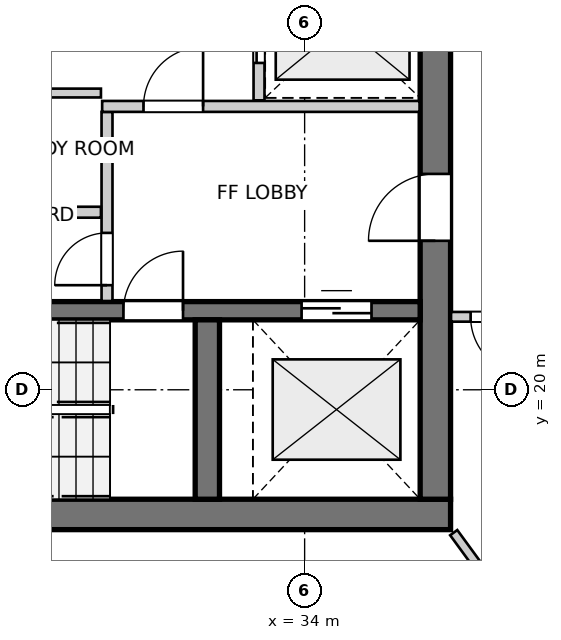
"""IFC4 building model, lengths in metres.
Left out: names, types, materials, properties, quantities, classifications, styles, units other than length and angle.
Written with IfcOpenShell. Run it as: python <this file> out.ifc"""

import sys

from ifc_helpers import new_model, si_unit, direction, frame, frame_2d, origin, place, context, subcontext, project, spatial, rectangle, extrude, source, transform, mapped, element, fill, save


model = new_model("IFC4")
c1 = context("Model", 3, precision=1e-05, world=origin(), true_north=direction((0.0, 1.0)))
c2 = subcontext(c1, "Body", "Model", "MODEL_VIEW")
j1 = project(units=[si_unit("LENGTHUNIT", "METRE"), si_unit("PLANEANGLEUNIT", "RADIAN")], contexts=[c1])
p1 = place(None, origin())
s1 = spatial("IfcSite", under=j1, at=p1, CompositionType="ELEMENT")
p2 = place(p1, origin())
s2 = spatial("IfcBuilding", under=s1, at=p2, CompositionType="ELEMENT")
p3 = place(p2, frame((0.0, 0.0, 214.8)))
s3 = spatial("IfcBuildingStorey", under=s2, at=p3, CompositionType="ELEMENT", Elevation=214.8)
p4 = place(p3, frame((24.3, 17.95, 0.0), z_axis=(0.0, 0.0, 1.0), x_axis=(1.0, 0.0, 0.0)))
e1 = element("IfcWall", 1, at=p4, inside=s3, PredefinedType="SHEAR", context=c2, shape_type="SweptSolid", body=[
    extrude(rectangle(XDim=12.1, YDim=0.5, at=frame_2d((6.05, 0.0))), origin(), (0.0, 0.0, 1.0), 2.96),
])
p5 = place(p3, frame((36.15, 18.2, 0.0), z_axis=(0.0, 0.0, 1.0), x_axis=(0.0, 1.0, 0.0)))
e2 = element("IfcWall", 2, at=p5, inside=s3, PredefinedType="SHEAR", context=c2, shape_type="SweptSolid", body=[
    extrude(rectangle(XDim=15.6, YDim=0.5, at=frame_2d((7.8, 0.0))), origin(), (0.0, 0.0, 1.0), 2.96),
])
p6 = place(p5, frame((4.25, 0.0, 0.0)))
e3 = element("IfcOpeningElement", 3, at=p6, cuts=e2, PredefinedType="OPENING", context=c2, shape_type="SweptSolid", body=[
    extrude(rectangle(XDim=1.1, YDim=2.15, at=frame_2d((0.55, 1.075))), frame((0.0, 0.26, 0.0), z_axis=(0.0, -1.0, 0.0), x_axis=(1.0, 0.0, 0.0)), (0.0, 0.0, 1.0), 0.52),
])
p7 = place(p5, frame((10.25, 0.0, 0.0)))
e4 = element("IfcOpeningElement", 4, at=p7, cuts=e2, PredefinedType="OPENING", context=c2, shape_type="SweptSolid", body=[
    extrude(rectangle(XDim=1.1, YDim=2.15, at=frame_2d((0.55, 1.075))), frame((0.0, 0.26, 0.0), z_axis=(0.0, -1.0, 0.0), x_axis=(1.0, 0.0, 0.0)), (0.0, 0.0, 1.0), 0.52),
])
p8 = place(p3, frame((24.8, 21.3, 0.0), z_axis=(0.0, 0.0, 1.0), x_axis=(1.0, 0.0, 0.0)))
e5 = element("IfcWall", 5, at=p8, inside=s3, PredefinedType="SHEAR", context=c2, shape_type="SweptSolid", body=[
    extrude(rectangle(XDim=11.1, YDim=0.3, at=frame_2d((5.55, 0.0))), origin(), (0.0, 0.0, 1.0), 2.96),
])
p9 = place(p8, frame((6.22, 0.0, 0.0)))
e6 = element("IfcOpeningElement", 6, at=p9, cuts=e5, PredefinedType="OPENING", context=c2, shape_type="SweptSolid", body=[
    extrude(rectangle(XDim=0.98, YDim=2.15, at=frame_2d((0.49, 1.075))), frame((0.0, 0.16, 0.0), z_axis=(0.0, -1.0, 0.0), x_axis=(1.0, 0.0, 0.0)), (0.0, 0.0, 1.0), 0.32),
])
p10 = place(p8, frame((9.15, 0.0, 0.0)))
e7 = element("IfcOpeningElement", 7, at=p10, cuts=e5, PredefinedType="OPENING", context=c2, shape_type="SweptSolid", body=[
    extrude(rectangle(XDim=1.15, YDim=2.15, at=frame_2d((0.575, 1.075))), frame((0.0, 0.16, 0.0), z_axis=(0.0, -1.0, 0.0), x_axis=(1.0, 0.0, 0.0)), (0.0, 0.0, 1.0), 0.32),
])
p11 = place(p3, frame((32.4, 18.2, 0.0), z_axis=(0.0, 0.0, 1.0), x_axis=(0.0, 1.0, 0.0)))
e8 = element("IfcWall", 8, at=p11, inside=s3, PredefinedType="SHEAR", context=c2, shape_type="SweptSolid", body=[
    extrude(rectangle(XDim=2.95, YDim=0.4, at=frame_2d((1.475, 0.0))), origin(), (0.0, 0.0, 1.0), 2.96),
])
p12 = place(p3, frame((30.75, 21.46, 0.0), z_axis=(0.0, 0.0, 1.0), x_axis=(0.0, 1.0, 0.0)))
e9 = element("IfcWall", 9, at=p12, inside=s3, PredefinedType="PARTITIONING", context=c2, shape_type="SweptSolid", body=[
    extrude(rectangle(XDim=3.11, YDim=0.18, at=frame_2d((1.555, 0.0))), origin(), (0.0, 0.0, 1.0), 2.96),
])
p13 = place(p12, frame((0.26, 0.0, 0.0)))
e10 = element("IfcOpeningElement", 10, at=p13, cuts=e9, PredefinedType="OPENING", context=c2, shape_type="SweptSolid", body=[
    extrude(rectangle(XDim=0.86, YDim=2.05, at=frame_2d((0.43, 1.025))), frame((0.0, 0.1, 0.0), z_axis=(0.0, -1.0, 0.0), x_axis=(1.0, 0.0, 0.0)), (0.0, 0.0, 1.0), 0.2),
])
p14 = place(p3, frame((30.67, 24.66, 0.0), z_axis=(0.0, 0.0, 1.0), x_axis=(1.0, 0.0, 0.0)))
e11 = element("IfcWall", 11, at=p14, inside=s3, PredefinedType="PARTITIONING", context=c2, shape_type="SweptSolid", body=[
    extrude(rectangle(XDim=5.22, YDim=0.18, at=frame_2d((2.61, 0.0))), origin(), (0.0, 0.0, 1.0), 2.96),
])
p15 = place(p14, frame((0.68, 0.0, 0.0)))
e12 = element("IfcOpeningElement", 12, at=p15, cuts=e11, PredefinedType="OPENING", context=c2, shape_type="SweptSolid", body=[
    extrude(rectangle(XDim=0.98, YDim=2.15, at=frame_2d((0.49, 1.075))), frame((0.0, 0.1, 0.0), z_axis=(0.0, -1.0, 0.0), x_axis=(1.0, 0.0, 0.0)), (0.0, 0.0, 1.0), 0.2),
])
p16 = place(p3, frame((33.25, 24.76, 0.0), z_axis=(0.0, 0.0, 1.0), x_axis=(0.0, 1.0, 0.0)))
e13 = element("IfcWall", 13, at=p16, inside=s3, PredefinedType="PARTITIONING", context=c2, shape_type="SweptSolid", body=[
    extrude(rectangle(XDim=2.48, YDim=0.18, at=frame_2d((1.24, 0.0))), origin(), (0.0, 0.0, 1.0), 2.96),
])
p17 = place(p16, frame((0.615, 0.0, 0.0)))
e14 = element("IfcOpeningElement", 14, at=p17, cuts=e13, PredefinedType="OPENING", context=c2, shape_type="SweptSolid", body=[
    extrude(rectangle(XDim=1.25, YDim=2.15, at=frame_2d((0.625, 1.075))), frame((0.0, 0.1, 0.0), z_axis=(0.0, -1.0, 0.0), x_axis=(1.0, 0.0, 0.0)), (0.0, 0.0, 1.0), 0.2),
])
p18 = place(p3, frame((24.81, 22.92, 0.0), z_axis=(0.0, 0.0, 1.0), x_axis=(1.0, 0.0, 0.0)))
e15 = element("IfcWall", 15, at=p18, inside=s3, PredefinedType="PARTITIONING", context=c2, shape_type="SweptSolid", body=[
    extrude(rectangle(XDim=5.84, YDim=0.18, at=frame_2d((2.92, 0.0))), origin(), (0.0, 0.0, 1.0), 2.96),
])
p19 = place(p3, frame((24.81, 24.88, 0.0), z_axis=(0.0, 0.0, 1.0), x_axis=(1.0, 0.0, 0.0)))
e16 = element("IfcWall", 16, at=p19, inside=s3, PredefinedType="PARTITIONING", context=c2, shape_type="SweptSolid", body=[
    extrude(rectangle(XDim=5.84, YDim=0.145, at=frame_2d((2.92, 0.0))), origin(), (0.0, 0.0, 1.0), 2.96),
])
p20 = place(p19, frame((2.4, 0.0, 0.0)))
e17 = element("IfcOpeningElement", 17, at=p20, cuts=e16, PredefinedType="OPENING", context=c2, shape_type="SweptSolid", body=[
    extrude(rectangle(XDim=0.96, YDim=2.1, at=frame_2d((0.48, 1.05))), frame((0.0, 0.083, 0.0), z_axis=(0.0, -1.0, 0.0), x_axis=(1.0, 0.0, 0.0)), (0.0, 0.0, 1.0), 0.165),
])
p21 = place(p3, frame((38.02, 21.2, 0.0), z_axis=(0.0, 0.0, 1.0), x_axis=(-1.0, 0.0, 0.0)))
e18 = element("IfcWall", 18, at=p21, inside=s3, PredefinedType="PARTITIONING", context=c2, shape_type="SweptSolid", body=[
    extrude(rectangle(XDim=1.612, YDim=0.16, at=frame_2d((0.806, 0.0))), origin(), (0.0, 0.0, 1.0), 2.96),
])
p22 = place(p21, frame((0.33, 0.0, 0.0)))
e19 = element("IfcOpeningElement", 19, at=p22, cuts=e18, PredefinedType="OPENING", context=c2, shape_type="SweptSolid", body=[
    extrude(rectangle(XDim=0.96, YDim=2.1, at=frame_2d((0.48, 1.05))), frame((0.0, 0.09, 0.0), z_axis=(0.0, -1.0, 0.0), x_axis=(1.0, 0.0, 0.0)), (0.0, 0.0, 1.0), 0.18),
])
p23 = place(p3, frame((36.452, 17.651, 0.0), z_axis=(0.0, 0.0, 1.0), x_axis=(0.58995882053, -0.807433334758, 0.0)))
e20 = element("IfcWall", 20, at=p23, inside=s3, PredefinedType="PARTITIONING", context=c2, shape_type="SweptSolid", body=[
    extrude(rectangle(XDim=5.722, YDim=0.145, at=frame_2d((2.861, 0.0))), origin(), (0.0, 0.0, 1.0), 2.96),
])
m1 = source(origin(), c2, "Body", "SweptSolid", [
    extrude(rectangle(XDim=0.98, YDim=2.15, at=frame_2d((0.49, 1.075))), frame((0.0, 0.025, 0.0), z_axis=(0.0, -1.0, 0.0), x_axis=(1.0, 0.0, 0.0)), (0.0, 0.0, 1.0), 0.05),
])
p24 = place(p9, origin())
e21 = element("IfcDoor", 21, at=p24, inside=s3, OperationType="SINGLE_SWING_RIGHT", PredefinedType="DOOR", context=c2, shape_type="MappedRepresentation", body=[
    mapped(m1, transform((0.0, 0.0, 0.0), x_axis=(1.0, 0.0, 0.0), y_axis=(0.0, 1.0, 0.0), z_axis=(0.0, 0.0, 1.0), scale=1.0)),
])
fill(e6, e21)
m2 = source(origin(), c2, "Body", "SweptSolid", [
    extrude(rectangle(XDim=1.15, YDim=2.15, at=frame_2d((0.575, 1.075))), frame((0.0, 0.025, 0.0), z_axis=(0.0, -1.0, 0.0), x_axis=(1.0, 0.0, 0.0)), (0.0, 0.0, 1.0), 0.05),
])
p25 = place(p10, origin())
e22 = element("IfcDoor", 22, at=p25, inside=s3, OperationType="DOUBLE_DOOR_SLIDING", PredefinedType="DOOR", context=c2, shape_type="MappedRepresentation", body=[
    mapped(m2, transform((0.0, 0.0, 0.0), x_axis=(1.0, 0.0, 0.0), y_axis=(0.0, 1.0, 0.0), z_axis=(0.0, 0.0, 1.0), scale=1.0)),
])
fill(e7, e22)
m3 = source(origin(), c2, "Body", "SweptSolid", [
    extrude(rectangle(XDim=1.1, YDim=2.15, at=frame_2d((0.55, 1.075))), frame((0.0, 0.025, 0.0), z_axis=(0.0, -1.0, 0.0), x_axis=(1.0, 0.0, 0.0)), (0.0, 0.0, 1.0), 0.05),
])
p26 = place(p6, origin())
e23 = element("IfcDoor", 23, at=p26, inside=s3, OperationType="SINGLE_SWING_LEFT", PredefinedType="DOOR", context=c2, shape_type="MappedRepresentation", body=[
    mapped(m3, transform((0.0, 0.0, 0.0), x_axis=(1.0, 0.0, 0.0), y_axis=(0.0, 1.0, 0.0), z_axis=(0.0, 0.0, 1.0), scale=1.0)),
])
fill(e3, e23)
m4 = source(origin(), c2, "Body", "SweptSolid", [
    extrude(rectangle(XDim=0.86, YDim=2.05, at=frame_2d((0.43, 1.025))), frame((0.0, 0.025, 0.0), z_axis=(0.0, -1.0, 0.0), x_axis=(1.0, 0.0, 0.0)), (0.0, 0.0, 1.0), 0.05),
])
p27 = place(p13, origin())
e24 = element("IfcDoor", 24, at=p27, inside=s3, OperationType="SINGLE_SWING_LEFT", PredefinedType="DOOR", context=c2, shape_type="MappedRepresentation", body=[
    mapped(m4, transform((0.0, 0.0, 0.0), x_axis=(1.0, 0.0, 0.0), y_axis=(0.0, 1.0, 0.0), z_axis=(0.0, 0.0, 1.0), scale=1.0)),
])
fill(e10, e24)
p28 = place(p15, origin())
e25 = element("IfcDoor", 25, at=p28, inside=s3, OperationType="SINGLE_SWING_RIGHT", PredefinedType="DOOR", context=c2, shape_type="MappedRepresentation", body=[
    mapped(m1, transform((0.0, 0.0, 0.0), x_axis=(1.0, 0.0, 0.0), y_axis=(0.0, 1.0, 0.0), z_axis=(0.0, 0.0, 1.0), scale=1.0)),
])
fill(e12, e25)
m5 = source(origin(), c2, "Body", "SweptSolid", [
    extrude(rectangle(XDim=1.25, YDim=2.15, at=frame_2d((0.625, 1.075))), frame((0.0, 0.025, 0.0), z_axis=(0.0, -1.0, 0.0), x_axis=(1.0, 0.0, 0.0)), (0.0, 0.0, 1.0), 0.05),
])
p29 = place(p17, origin())
e26 = element("IfcDoor", 26, at=p29, inside=s3, OperationType="DOUBLE_DOOR_SLIDING", PredefinedType="DOOR", context=c2, shape_type="MappedRepresentation", body=[
    mapped(m5, transform((0.0, 0.0, 0.0), x_axis=(1.0, 0.0, 0.0), y_axis=(0.0, 1.0, 0.0), z_axis=(0.0, 0.0, 1.0), scale=1.0)),
])
fill(e14, e26)
m6 = source(origin(), c2, "Body", "SweptSolid", [
    extrude(rectangle(XDim=0.96, YDim=2.1, at=frame_2d((0.48, 1.05))), frame((0.0, 0.025, 0.0), z_axis=(0.0, -1.0, 0.0), x_axis=(1.0, 0.0, 0.0)), (0.0, 0.0, 1.0), 0.05),
])
p30 = place(p22, origin())
e27 = element("IfcDoor", 27, at=p30, inside=s3, OperationType="SINGLE_SWING_LEFT", PredefinedType="DOOR", context=c2, shape_type="MappedRepresentation", body=[
    mapped(m6, transform((0.0, 0.0, 0.0), x_axis=(1.0, 0.0, 0.0), y_axis=(0.0, 1.0, 0.0), z_axis=(0.0, 0.0, 1.0), scale=1.0)),
])
fill(e19, e27)
save(model, sys.argv[1])
